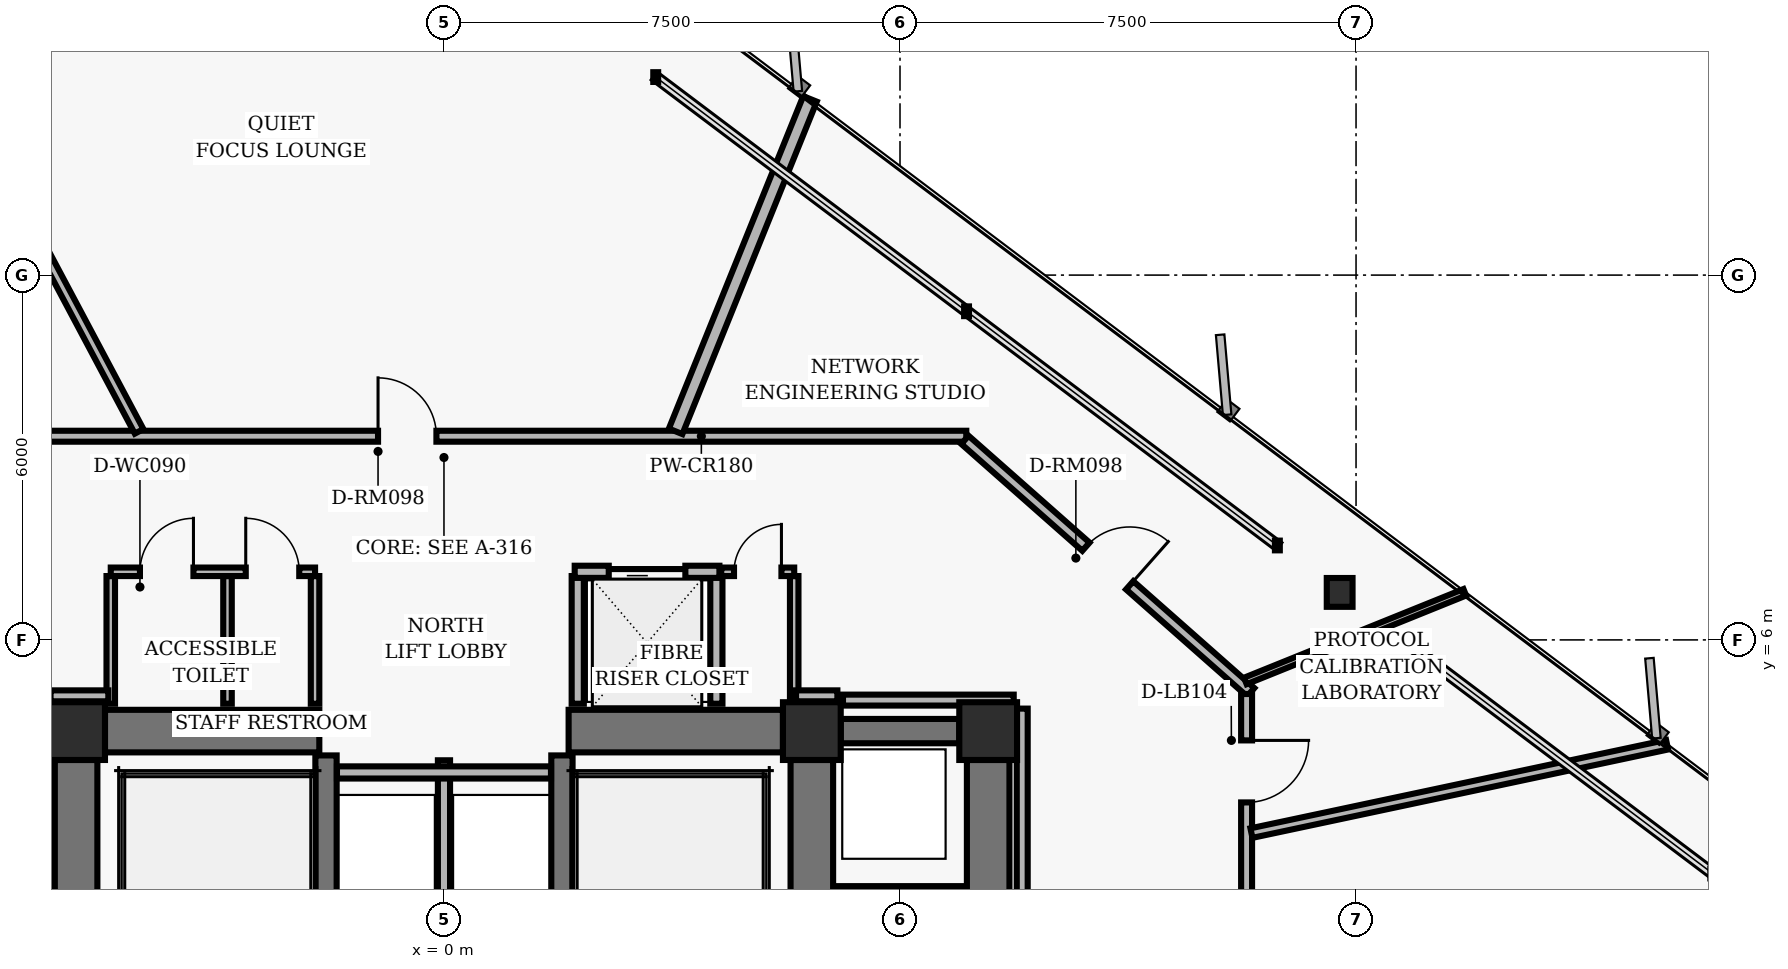
"""IFC4 building model, lengths in metres.
Left out: names, types, materials, properties, quantities, classifications, styles, units other than length and angle.
Written with IfcOpenShell. Run it as: python <this file> out.ifc"""

import sys

from ifc_helpers import new_model, si_unit, direction, frame, frame_2d, origin, origin_2d, place, context, subcontext, project, spatial, rectangle, hollow_rectangle, i_section, extrude, element, fill, save


model = new_model("IFC4")
c1 = context("Model", 3, precision=1e-05, world=origin(), true_north=direction((0.0, 1.0)))
c2 = subcontext(c1, "Body", "Model", "MODEL_VIEW")
j1 = project(units=[si_unit("LENGTHUNIT", "METRE"), si_unit("PLANEANGLEUNIT", "RADIAN")], contexts=[c1])
p1 = place(None, origin())
s1 = spatial("IfcSite", under=j1, at=p1, CompositionType="ELEMENT")
p2 = place(p1, origin())
s2 = spatial("IfcBuilding", under=s1, at=p2, CompositionType="ELEMENT")
p3 = place(p2, frame((0.0, 0.0, 56.32)))
s3 = spatial("IfcBuildingStorey", under=s2, at=p3, CompositionType="ELEMENT", Elevation=56.32)
for number, where, z_axis, x_axis in (
    (1, (-6.05, 4.5, 0.0), (0.0, 0.0, 1.0), (1.0, 0.0, 0.0)),
    (2, (6.05, 4.5, 0.0), (0.0, 0.0, 1.0), (1.0, 0.0, 0.0)),
    (3, (8.95, 4.5, 0.0), (0.0, 0.0, 1.0), (1.0, 0.0, 0.0)),
):
    element("IfcColumn", number, at=place(p3, frame(where, z_axis=z_axis, x_axis=x_axis)), inside=s3, PredefinedType="COLUMN", context=c2, shape_type="SweptSolid", body=[
        extrude(hollow_rectangle(XDim=0.95, YDim=0.95, WallThickness=0.06, InnerFilletRadius=0.02, OuterFilletRadius=0.04, at=origin_2d()), origin(), (0.0, 0.0, 1.0), 3.36),
    ])
for number, where, z_axis, x_axis in (
    (4, (-6.05, 0.475, 0.0), (0.0, 0.0, 1.0), (0.0, 1.0, 0.0)),
    (5, (6.05, 0.475, 0.0), (0.0, 0.0, 1.0), (0.0, 1.0, 0.0)),
):
    element("IfcWall", number, at=place(p3, frame(where, z_axis=z_axis, x_axis=x_axis)), inside=s3, PredefinedType="SHEAR", context=c2, shape_type="SweptSolid", body=[
        extrude(rectangle(XDim=3.55, YDim=0.7, at=frame_2d((1.775, 0.0))), origin(), (0.0, 0.0, 1.0), 3.098),
    ])
for number, where, z_axis, x_axis in (
    (6, (-1.94, -4.1, 0.0), (0.0, 0.0, 1.0), (0.0, 1.0, 0.0)),
    (7, (1.94, -4.1, 0.0), (0.0, 0.0, 1.0), (0.0, 1.0, 0.0)),
):
    element("IfcWall", number, at=place(p3, frame(where, z_axis=z_axis, x_axis=x_axis)), inside=s3, PredefinedType="SHEAR", context=c2, shape_type="SweptSolid", body=[
        extrude(rectangle(XDim=8.2, YDim=0.35, at=frame_2d((4.1, 0.0))), origin(), (0.0, 0.0, 1.0), 3.098),
    ])
for number, where, z_axis, x_axis in (
    (8, (-5.575, 4.5, 0.0), (0.0, 0.0, 1.0), (1.0, 0.0, 0.0)),
    (9, (2.05, 4.5, 0.0), (0.0, 0.0, 1.0), (1.0, 0.0, 0.0)),
):
    element("IfcWall", number, at=place(p3, frame(where, z_axis=z_axis, x_axis=x_axis)), inside=s3, PredefinedType="SHEAR", context=c2, shape_type="SweptSolid", body=[
        extrude(rectangle(XDim=3.525, YDim=0.7, at=frame_2d((1.762, 0.0))), origin(), (0.0, 0.0, 1.0), 3.098),
    ])
p4 = place(p3, frame((8.95, -3.825, 0.0), z_axis=(0.0, 0.0, 1.0), x_axis=(0.0, 1.0, 0.0)))
e10 = element("IfcWall", 10, at=p4, inside=s3, PredefinedType="SHEAR", context=c2, shape_type="SweptSolid", body=[
    extrude(rectangle(XDim=7.85, YDim=0.7, at=frame_2d((3.925, 0.0))), origin(), (0.0, 0.0, 1.0), 3.098),
])
p5 = place(p3, frame((6.525, 4.5, 0.0), z_axis=(0.0, 0.0, 1.0), x_axis=(1.0, 0.0, 0.0)))
e11 = element("IfcWall", 11, at=p5, inside=s3, PredefinedType="SHEAR", context=c2, shape_type="SweptSolid", body=[
    extrude(rectangle(XDim=1.95, YDim=0.4, at=frame_2d((0.975, 0.0))), origin(), (0.0, 0.0, 1.0), 3.098),
])
p6 = place(p3, frame((14.73, 6.781, 0.0), z_axis=(0.0, 0.0, 1.0), x_axis=(1.0, 0.0, 0.0)))
e12 = element("IfcColumn", 12, at=p6, inside=s3, PredefinedType="COLUMN", context=c2, shape_type="SweptSolid", body=[
    extrude(i_section(OverallWidth=0.424, OverallDepth=0.474, WebThickness=0.048, FlangeThickness=0.077, FilletRadius=0.025, at=origin_2d()), origin(), (0.0, 0.0, 1.0), 3.36),
])
p7 = place(p3, frame((0.0, 1.25, 0.0), z_axis=(0.0, 0.0, 1.0), x_axis=(0.0, 1.0, 0.0)))
e13 = element("IfcWall", 13, at=p7, inside=s3, PredefinedType="PARTITIONING", context=c2, shape_type="SweptSolid", body=[
    extrude(rectangle(XDim=2.77, YDim=0.2, at=frame_2d((1.385, 0.0))), origin(), (0.0, 0.0, 1.0), 3.073),
])
p8 = place(p3, frame((-1.76, 3.82, 0.0), z_axis=(0.0, 0.0, 1.0), x_axis=(1.0, 0.0, 0.0)))
e14 = element("IfcWall", 14, at=p8, inside=s3, PredefinedType="PARTITIONING", context=c2, shape_type="SweptSolid", body=[
    extrude(rectangle(XDim=3.52, YDim=0.2, at=frame_2d((1.76, 0.0))), origin(), (0.0, 0.0, 1.0), 3.073),
])
for number, where, z_axis, x_axis in (
    (15, (2.2, 4.95, 0.0), (0.0, 0.0, 1.0), (0.0, 1.0, 0.0)),
    (16, (4.48, 4.95, 0.0), (0.0, 0.0, 1.0), (0.0, 1.0, 0.0)),
):
    element("IfcWall", number, at=place(p3, frame(where, z_axis=z_axis, x_axis=x_axis)), inside=s3, PredefinedType="PARTITIONING", context=c2, shape_type="SweptSolid", body=[
        extrude(rectangle(XDim=2.1, YDim=0.2, at=frame_2d((1.05, 0.0))), origin(), (0.0, 0.0, 1.0), 3.073),
    ])
p9 = place(p3, frame((2.15, 7.12, 0.0), z_axis=(0.0, 0.0, 1.0), x_axis=(1.0, 0.0, 0.0)))
e17 = element("IfcWall", 17, at=p9, inside=s3, PredefinedType="PARTITIONING", context=c2, shape_type="SweptSolid", body=[
    extrude(rectangle(XDim=2.38, YDim=0.2, at=frame_2d((1.19, 0.0))), origin(), (0.0, 0.0, 1.0), 2.587),
])
p10 = place(p9, frame((0.56, 0.0, 0.0)))
e18 = element("IfcOpeningElement", 18, at=p10, cuts=e17, PredefinedType="OPENING", context=c2, shape_type="SweptSolid", body=[
    extrude(rectangle(XDim=1.26, YDim=2.06, at=frame_2d((0.63, 1.03))), frame((0.0, 0.11, 0.0), z_axis=(0.0, -1.0, 0.0), x_axis=(1.0, 0.0, 0.0)), (0.0, 0.0, 1.0), 0.22),
])
for number, where, z_axis, x_axis in (
    (19, (-5.48, 4.95, 0.0), (0.0, 0.0, 1.0), (0.0, 1.0, 0.0)),
    (20, (-3.56, 4.95, 0.0), (0.0, 0.0, 1.0), (0.0, 1.0, 0.0)),
    (21, (-2.12, 4.95, 0.0), (0.0, 0.0, 1.0), (0.0, 1.0, 0.0)),
):
    element("IfcWall", number, at=place(p3, frame(where, z_axis=z_axis, x_axis=x_axis)), inside=s3, PredefinedType="PARTITIONING", context=c2, shape_type="SweptSolid", body=[
        extrude(rectangle(XDim=2.1, YDim=0.14, at=frame_2d((1.05, 0.0))), origin(), (0.0, 0.0, 1.0), 3.073),
    ])
p11 = place(p3, frame((-5.48, 7.12, 0.0), z_axis=(0.0, 0.0, 1.0), x_axis=(1.0, 0.0, 0.0)))
e22 = element("IfcWall", 22, at=p11, inside=s3, PredefinedType="PARTITIONING", context=c2, shape_type="SweptSolid", body=[
    extrude(rectangle(XDim=3.36, YDim=0.14, at=frame_2d((1.68, 0.0))), origin(), (0.0, 0.0, 1.0), 3.073),
])
p12 = place(p11, frame((0.48, 0.0, 0.0)))
e23 = element("IfcOpeningElement", 23, at=p12, cuts=e22, PredefinedType="OPENING", context=c2, shape_type="SweptSolid", body=[
    extrude(rectangle(XDim=0.88, YDim=2.02, at=frame_2d((0.44, 1.01))), frame((0.0, 0.08, 0.0), z_axis=(0.0, -1.0, 0.0), x_axis=(1.0, 0.0, 0.0)), (0.0, 0.0, 1.0), 0.16),
])
p13 = place(p11, frame((2.22, 0.0, 0.0)))
e24 = element("IfcOpeningElement", 24, at=p13, cuts=e22, PredefinedType="OPENING", context=c2, shape_type="SweptSolid", body=[
    extrude(rectangle(XDim=0.88, YDim=2.02, at=frame_2d((0.44, 1.01))), frame((0.0, 0.08, 0.0), z_axis=(0.0, -1.0, 0.0), x_axis=(1.0, 0.0, 0.0)), (0.0, 0.0, 1.0), 0.16),
])
p14 = place(p3, frame((5.76, 4.95, 0.0), z_axis=(0.0, 0.0, 1.0), x_axis=(0.0, 1.0, 0.0)))
e25 = element("IfcWall", 25, at=p14, inside=s3, PredefinedType="PARTITIONING", context=c2, shape_type="SweptSolid", body=[
    extrude(rectangle(XDim=2.1, YDim=0.14, at=frame_2d((1.05, 0.0))), origin(), (0.0, 0.0, 1.0), 3.073),
])
p15 = place(p3, frame((4.56, 7.12, 0.0), z_axis=(0.0, 0.0, 1.0), x_axis=(1.0, 0.0, 0.0)))
e26 = element("IfcWall", 26, at=p15, inside=s3, PredefinedType="PARTITIONING", context=c2, shape_type="SweptSolid", body=[
    extrude(rectangle(XDim=1.2, YDim=0.14, at=frame_2d((0.6, 0.0))), origin(), (0.0, 0.0, 1.0), 2.587),
])
p16 = place(p15, frame((0.21, 0.0, 0.0)))
e27 = element("IfcOpeningElement", 27, at=p16, cuts=e26, PredefinedType="OPENING", context=c2, shape_type="SweptSolid", body=[
    extrude(rectangle(XDim=0.78, YDim=2.01, at=frame_2d((0.39, 1.005))), frame((0.0, 0.08, 0.0), z_axis=(0.0, -1.0, 0.0), x_axis=(1.0, 0.0, 0.0)), (0.0, 0.0, 1.0), 0.16),
])
p17 = place(p3, frame((6.45, 1.85, 0.0), z_axis=(0.0, 0.0, 1.0), x_axis=(1.0, 0.0, 0.0)))
e28 = element("IfcWall", 28, at=p17, inside=s3, PredefinedType="PARTITIONING", context=c2, shape_type="SweptSolid", body=[
    extrude(rectangle(XDim=2.1, YDim=0.2, at=frame_2d((1.05, 0.0))), origin(), (0.0, 0.0, 1.0), 3.073),
])
p18 = place(p3, frame((-8.59, 9.35, 0.0), z_axis=(0.0, 0.0, 1.0), x_axis=(1.0, 0.0, 0.0)))
e29 = element("IfcWall", 29, at=p18, inside=s3, PredefinedType="PARTITIONING", context=c2, shape_type="SweptSolid", body=[
    extrude(rectangle(XDim=17.18, YDim=0.18, at=frame_2d((8.59, 0.0))), origin(), (0.0, 0.0, 1.0), 3.073),
])
p19 = place(p18, frame((7.506, 0.0, 0.0)))
e30 = element("IfcOpeningElement", 30, at=p19, cuts=e29, PredefinedType="OPENING", context=c2, shape_type="SweptSolid", body=[
    extrude(rectangle(XDim=0.96, YDim=2.02, at=frame_2d((0.48, 1.01))), frame((0.0, 0.1, 0.0), z_axis=(0.0, -1.0, 0.0), x_axis=(1.0, 0.0, 0.0)), (0.0, 0.0, 1.0), 0.2),
])
p20 = place(p3, frame((8.567, 9.29, 0.0), z_axis=(0.0, 0.0, 1.0), x_axis=(0.749626463267, -0.66186113768, 0.0)))
e31 = element("IfcWall", 31, at=p20, inside=s3, PredefinedType="PARTITIONING", context=c2, shape_type="SweptSolid", body=[
    extrude(rectangle(XDim=6.27, YDim=0.18, at=frame_2d((3.135, 0.0))), origin(), (0.0, 0.0, 1.0), 2.587),
])
p21 = place(p20, frame((2.655, 0.0, 0.0)))
e32 = element("IfcOpeningElement", 32, at=p21, cuts=e31, PredefinedType="OPENING", context=c2, shape_type="SweptSolid", body=[
    extrude(rectangle(XDim=0.96, YDim=2.02, at=frame_2d((0.48, 1.01))), frame((0.0, 0.1, 0.0), z_axis=(0.0, -1.0, 0.0), x_axis=(1.0, 0.0, 0.0)), (0.0, 0.0, 1.0), 0.2),
])
p22 = place(p3, frame((13.2, 5.11, 0.0), z_axis=(0.0, 0.0, 1.0), x_axis=(0.0, -1.0, 0.0)))
e33 = element("IfcWall", 33, at=p22, inside=s3, PredefinedType="PARTITIONING", context=c2, shape_type="SweptSolid", body=[
    extrude(rectangle(XDim=10.22, YDim=0.18, at=frame_2d((5.11, 0.0))), origin(), (0.0, 0.0, 1.0), 3.073),
])
p23 = place(p22, frame((5.644, 0.0, 0.0)))
e34 = element("IfcOpeningElement", 34, at=p23, cuts=e33, PredefinedType="OPENING", context=c2, shape_type="SweptSolid", body=[
    extrude(rectangle(XDim=0.96, YDim=2.02, at=frame_2d((0.48, 1.01))), frame((0.0, 0.1, 0.0), z_axis=(0.0, -1.0, 0.0), x_axis=(1.0, 0.0, 0.0)), (0.0, 0.0, 1.0), 0.2),
])
p24 = place(p22, frame((0.763, 0.0, 0.0)))
e35 = element("IfcOpeningElement", 35, at=p24, cuts=e33, PredefinedType="OPENING", context=c2, shape_type="SweptSolid", body=[
    extrude(rectangle(XDim=1.02, YDim=2.02, at=frame_2d((0.51, 1.01))), frame((0.0, 0.1, 0.0), z_axis=(0.0, -1.0, 0.0), x_axis=(1.0, 0.0, 0.0)), (0.0, 0.0, 1.0), 0.2),
])
p25 = place(p3, frame((9.51, -4.87, 0.0), z_axis=(0.0, 0.0, 1.0), x_axis=(0.0, 1.0, 0.0)))
e36 = element("IfcWall", 36, at=p25, inside=s3, PredefinedType="PARTITIONING", context=c2, shape_type="SweptSolid", body=[
    extrude(rectangle(XDim=9.74, YDim=0.18, at=frame_2d((4.87, 0.0))), origin(), (0.0, 0.0, 1.0), 3.073),
])
p26 = place(p3, frame((9.37, 5.01, 0.0), z_axis=(0.0, 0.0, 1.0), x_axis=(-1.0, 0.0, 0.0)))
e37 = element("IfcWall", 37, at=p26, inside=s3, PredefinedType="PARTITIONING", context=c2, shape_type="SweptSolid", body=[
    extrude(rectangle(XDim=2.808, YDim=0.18, at=frame_2d((1.404, 0.0))), origin(), (0.0, 0.0, 1.0), 3.073),
])
p27 = place(p3, frame((6.47, 5.08, 0.0), z_axis=(0.0, 0.0, 1.0), x_axis=(-1.0, 0.0, 0.0)))
e38 = element("IfcWall", 38, at=p27, inside=s3, PredefinedType="PARTITIONING", context=c2, shape_type="SweptSolid", body=[
    extrude(rectangle(XDim=0.68, YDim=0.18, at=frame_2d((0.34, 0.0))), origin(), (0.0, 0.0, 1.0), 3.073),
])
p28 = place(p3, frame((-5.52, 5.08, 0.0), z_axis=(0.0, 0.0, 1.0), x_axis=(-1.0, 0.0, 0.0)))
e39 = element("IfcWall", 39, at=p28, inside=s3, PredefinedType="PARTITIONING", context=c2, shape_type="SweptSolid", body=[
    extrude(rectangle(XDim=0.95, YDim=0.18, at=frame_2d((0.475, 0.0))), origin(), (0.0, 0.0, 1.0), 3.073),
])
p29 = place(p3, frame((13.28, 2.823, 0.0), z_axis=(0.0, 0.0, 1.0), x_axis=(0.978150237712, 0.207899284425, 0.0)))
e40 = element("IfcWall", 40, at=p29, inside=s3, PredefinedType="PARTITIONING", context=c2, shape_type="SweptSolid", body=[
    extrude(rectangle(XDim=6.988, YDim=0.16, at=frame_2d((3.494, 0.0))), origin(), (0.0, 0.0, 1.0), 3.073),
])
p30 = place(p3, frame((13.179, 5.325, 0.0), z_axis=(0.0, 0.0, 1.0), x_axis=(0.927199532139, 0.374567787725, 0.0)))
e41 = element("IfcWall", 41, at=p30, inside=s3, PredefinedType="MOVABLE", context=c2, shape_type="SweptSolid", body=[
    extrude(rectangle(XDim=3.893, YDim=0.115, at=frame_2d((1.946, 0.0))), origin(), (0.0, 0.0, 1.0), 3.073),
])
p31 = place(p3, frame((3.81, 9.43, 0.0), z_axis=(0.0, 0.0, 1.0), x_axis=(0.374593091461, 0.927189309596, 0.0)))
e42 = element("IfcWall", 42, at=p31, inside=s3, PredefinedType="PARTITIONING", context=c2, shape_type="SweptSolid", body=[
    extrude(rectangle(XDim=5.898, YDim=0.24, at=frame_2d((2.949, 0.0))), origin(), (0.0, 0.0, 1.0), 3.073),
])
p32 = place(p3, frame((-5.014, 9.43, 0.0), z_axis=(0.0, 0.0, 1.0), x_axis=(-0.469473054772, 0.882946799554, 0.0)))
e43 = element("IfcWall", 43, at=p32, inside=s3, PredefinedType="PARTITIONING", context=c2, shape_type="SweptSolid", body=[
    extrude(rectangle(XDim=16.379, YDim=0.16, at=frame_2d((8.19, 0.0))), origin(), (0.0, 0.0, 1.0), 3.073),
])
p33 = place(p10, origin())
e44 = element("IfcDoor", 44, at=p33, inside=s3, OperationType="SLIDING_TO_LEFT", PredefinedType="DOOR", context=c2, shape_type="SweptSolid", body=[
    extrude(rectangle(XDim=1.26, YDim=2.06, at=frame_2d((0.63, 1.03))), frame((0.0, 0.025, 0.0), z_axis=(0.0, -1.0, 0.0), x_axis=(1.0, 0.0, 0.0)), (0.0, 0.0, 1.0), 0.05),
])
fill(e18, e44)
p34 = place(p12, origin())
e45 = element("IfcDoor", 45, at=p34, inside=s3, OperationType="SINGLE_SWING_RIGHT", PredefinedType="DOOR", context=c2, shape_type="SweptSolid", body=[
    extrude(rectangle(XDim=0.88, YDim=2.02, at=frame_2d((0.44, 1.01))), frame((0.0, 0.025, 0.0), z_axis=(0.0, -1.0, 0.0), x_axis=(1.0, 0.0, 0.0)), (0.0, 0.0, 1.0), 0.05),
])
fill(e23, e45)
p35 = place(p13, origin())
e46 = element("IfcDoor", 46, at=p35, inside=s3, OperationType="SINGLE_SWING_LEFT", PredefinedType="DOOR", context=c2, shape_type="SweptSolid", body=[
    extrude(rectangle(XDim=0.88, YDim=2.02, at=frame_2d((0.44, 1.01))), frame((0.0, 0.025, 0.0), z_axis=(0.0, -1.0, 0.0), x_axis=(1.0, 0.0, 0.0)), (0.0, 0.0, 1.0), 0.05),
])
fill(e24, e46)
p36 = place(p16, origin())
e47 = element("IfcDoor", 47, at=p36, inside=s3, OperationType="SINGLE_SWING_RIGHT", PredefinedType="DOOR", context=c2, shape_type="SweptSolid", body=[
    extrude(rectangle(XDim=0.78, YDim=2.01, at=frame_2d((0.39, 1.005))), frame((0.0, 0.025, 0.0), z_axis=(0.0, -1.0, 0.0), x_axis=(1.0, 0.0, 0.0)), (0.0, 0.0, 1.0), 0.05),
])
fill(e27, e47)
p37 = place(p24, origin())
e48 = element("IfcDoor", 48, at=p37, inside=s3, OperationType="SINGLE_SWING_LEFT", PredefinedType="DOOR", context=c2, shape_type="SweptSolid", body=[
    extrude(rectangle(XDim=1.02, YDim=2.02, at=frame_2d((0.51, 1.01))), frame((0.0, 0.025, 0.0), z_axis=(0.0, -1.0, 0.0), x_axis=(1.0, 0.0, 0.0)), (0.0, 0.0, 1.0), 0.05),
])
fill(e35, e48)
p38 = place(p21, origin())
e49 = element("IfcDoor", 49, at=p38, inside=s3, OperationType="SINGLE_SWING_RIGHT", PredefinedType="DOOR", context=c2, shape_type="SweptSolid", body=[
    extrude(rectangle(XDim=0.96, YDim=2.02, at=frame_2d((0.48, 1.01))), frame((0.0, 0.025, 0.0), z_axis=(0.0, -1.0, 0.0), x_axis=(1.0, 0.0, 0.0)), (0.0, 0.0, 1.0), 0.05),
])
fill(e32, e49)
p39 = place(p19, origin())
e50 = element("IfcDoor", 50, at=p39, inside=s3, OperationType="SINGLE_SWING_LEFT", PredefinedType="DOOR", context=c2, shape_type="SweptSolid", body=[
    extrude(rectangle(XDim=0.96, YDim=2.02, at=frame_2d((0.48, 1.01))), frame((0.0, 0.025, 0.0), z_axis=(0.0, -1.0, 0.0), x_axis=(1.0, 0.0, 0.0)), (0.0, 0.0, 1.0), 0.05),
])
fill(e30, e50)
save(model, sys.argv[1])
